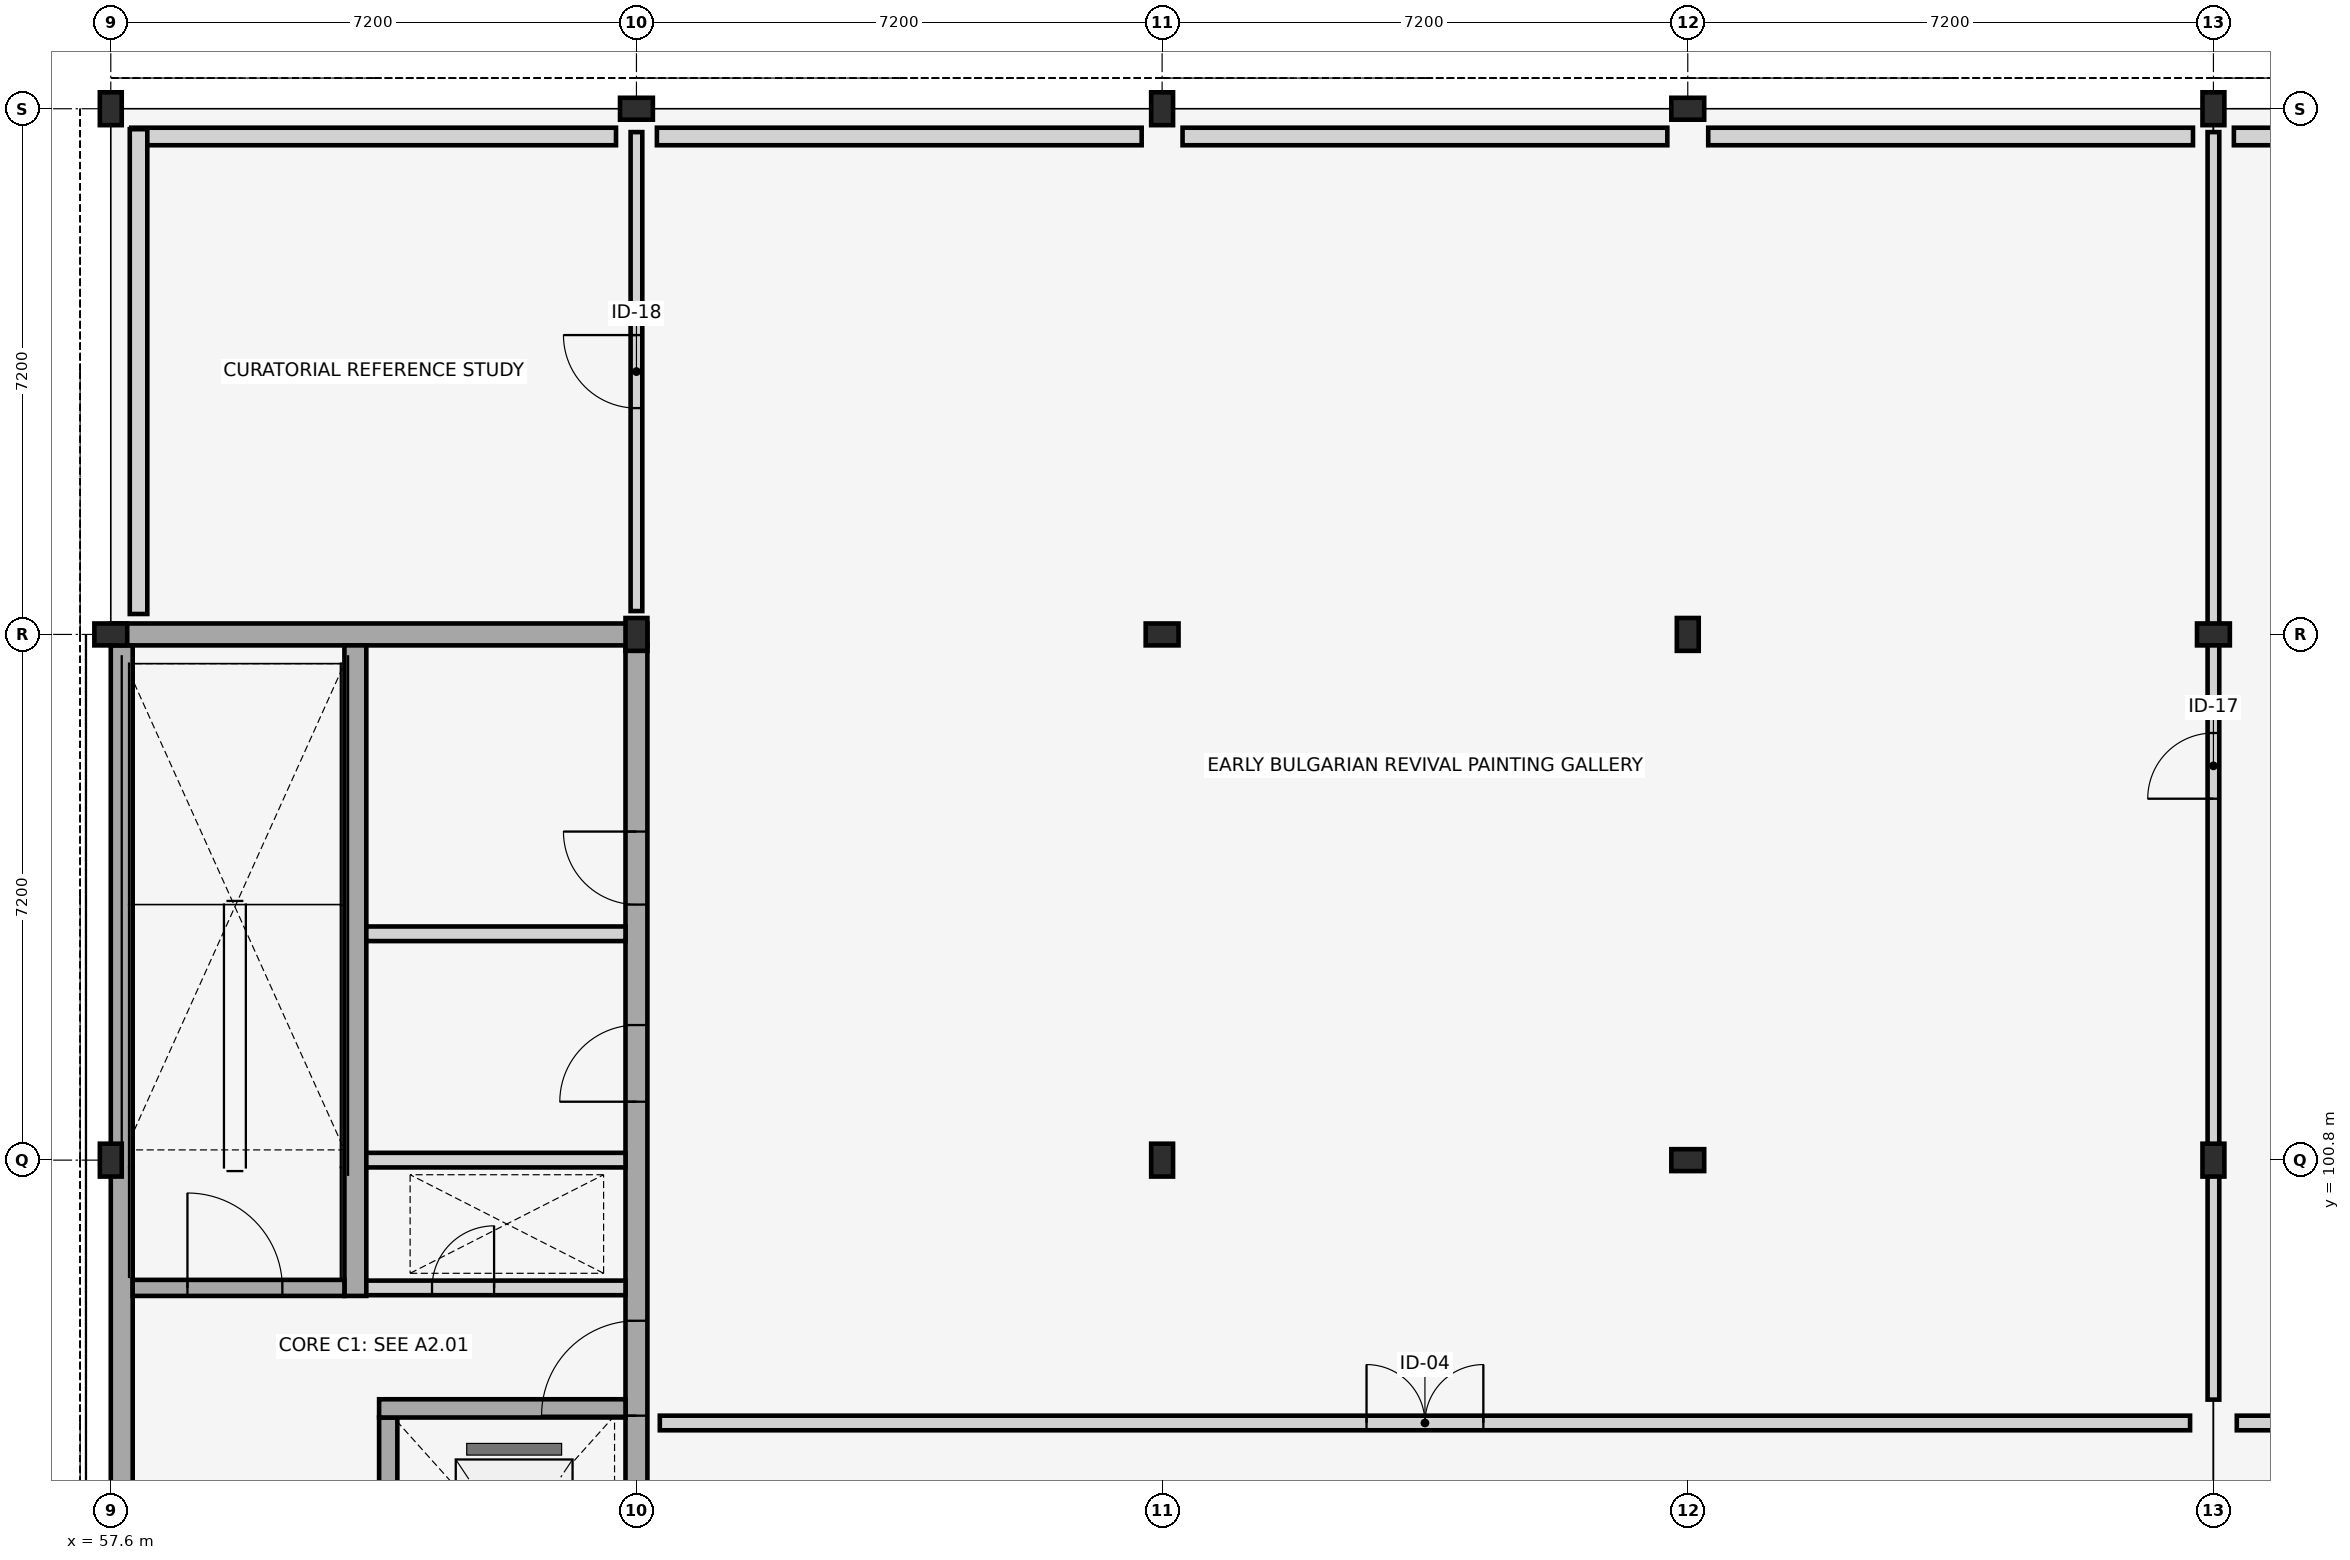
"""IFC4 building model, lengths in metres.
Left out: names, types, materials, properties, quantities, classifications, styles, units other than length and angle.
Written with IfcOpenShell. Run it as: python <this file> out.ifc"""

import sys

from ifc_helpers import new_model, si_unit, direction, frame, frame_2d, origin, origin_2d, place, context, subcontext, project, spatial, rectangle, i_section, extrude, element, fill, save


model = new_model("IFC4")
c1 = context("Model", 3, precision=1e-05, world=origin(), true_north=direction((0.0, 1.0)))
c2 = subcontext(c1, "Body", "Model", "MODEL_VIEW")
j1 = project(units=[si_unit("LENGTHUNIT", "METRE"), si_unit("PLANEANGLEUNIT", "RADIAN")], contexts=[c1])
p1 = place(None, origin())
s1 = spatial("IfcSite", under=j1, at=p1, CompositionType="ELEMENT")
p2 = place(p1, origin())
s2 = spatial("IfcBuilding", under=s1, at=p2, CompositionType="ELEMENT")
p3 = place(p2, frame((0.0, 0.0, 4.5)))
s3 = spatial("IfcBuildingStorey", under=s2, at=p3, CompositionType="ELEMENT", Elevation=4.5)
for number, where, z_axis, x_axis in (
    (1, (57.6, 100.8, 0.0), (0.0, 0.0, 1.0), (1.0, 0.0, 0.0)),
    (2, (57.6, 108.0, 0.0), (0.0, 0.0, 1.0), (0.0, 1.0, 0.0)),
    (3, (57.6, 115.2, 0.0), (0.0, 0.0, 1.0), (1.0, 0.0, 0.0)),
    (4, (64.8, 108.0, 0.0), (0.0, 0.0, 1.0), (1.0, 0.0, 0.0)),
    (5, (64.8, 115.2, 0.0), (0.0, 0.0, 1.0), (0.0, 1.0, 0.0)),
    (6, (72.0, 100.8, 0.0), (0.0, 0.0, 1.0), (1.0, 0.0, 0.0)),
    (7, (72.0, 108.0, 0.0), (0.0, 0.0, 1.0), (0.0, 1.0, 0.0)),
    (8, (72.0, 115.2, 0.0), (0.0, 0.0, 1.0), (1.0, 0.0, 0.0)),
    (9, (79.2, 100.8, 0.0), (0.0, 0.0, 1.0), (0.0, 1.0, 0.0)),
    (10, (79.2, 108.0, 0.0), (0.0, 0.0, 1.0), (1.0, 0.0, 0.0)),
    (11, (79.2, 115.2, 0.0), (0.0, 0.0, 1.0), (0.0, 1.0, 0.0)),
    (12, (86.4, 100.8, 0.0), (0.0, 0.0, 1.0), (1.0, 0.0, 0.0)),
    (13, (86.4, 108.0, 0.0), (0.0, 0.0, 1.0), (0.0, 1.0, 0.0)),
    (14, (86.4, 115.2, 0.0), (0.0, 0.0, 1.0), (1.0, 0.0, 0.0)),
):
    element("IfcColumn", number, at=place(p3, frame(where, z_axis=z_axis, x_axis=x_axis)), inside=s3, PredefinedType="COLUMN", context=c2, shape_type="SweptSolid", body=[
        extrude(i_section(OverallWidth=0.3, OverallDepth=0.45, WebThickness=0.014, FlangeThickness=0.026, FilletRadius=0.027, at=origin_2d()), origin(), (0.0, 0.0, 1.0), 4.2),
    ])
for number, where, z_axis, x_axis in (
    (15, (93.32, 114.82, 0.0), (0.0, 0.0, 1.0), (-1.0, 0.0, 0.0)),
    (16, (86.12, 114.82, 0.0), (0.0, 0.0, 1.0), (-1.0, 0.0, 0.0)),
):
    element("IfcWall", number, at=place(p3, frame(where, z_axis=z_axis, x_axis=x_axis)), inside=s3, PredefinedType="STANDARD", context=c2, shape_type="SweptSolid", body=[
        extrude(rectangle(XDim=6.64, YDim=0.24, at=frame_2d((3.32, 0.0))), origin(), (0.0, 0.0, 1.0), 3.58),
    ])
for number, where, z_axis, x_axis in (
    (17, (78.92, 114.82, 0.0), (0.0, 0.0, 1.0), (-1.0, 0.0, 0.0)),
    (18, (71.72, 114.82, 0.0), (0.0, 0.0, 1.0), (-1.0, 0.0, 0.0)),
):
    element("IfcWall", number, at=place(p3, frame(where, z_axis=z_axis, x_axis=x_axis)), inside=s3, PredefinedType="STANDARD", context=c2, shape_type="SweptSolid", body=[
        extrude(rectangle(XDim=6.64, YDim=0.24, at=frame_2d((3.32, 0.0))), origin(), (0.0, 0.0, 1.0), 3.58),
    ])
p4 = place(p3, frame((64.52, 114.82, 0.0), z_axis=(0.0, 0.0, 1.0), x_axis=(-1.0, 0.0, 0.0)))
e19 = element("IfcWall", 19, at=p4, inside=s3, PredefinedType="STANDARD", context=c2, shape_type="SweptSolid", body=[
    extrude(rectangle(XDim=6.64, YDim=0.24, at=frame_2d((3.32, 0.0))), origin(), (0.0, 0.0, 1.0), 3.58),
])
p5 = place(p3, frame((57.98, 114.92, 0.0), z_axis=(0.0, 0.0, 1.0), x_axis=(0.0, -1.0, 0.0)))
e20 = element("IfcWall", 20, at=p5, inside=s3, PredefinedType="STANDARD", context=c2, shape_type="SweptSolid", body=[
    extrude(rectangle(XDim=6.64, YDim=0.24, at=frame_2d((3.32, 0.0))), origin(), (0.0, 0.0, 1.0), 3.58),
])
p6 = place(p3, frame((57.6, 108.0, 0.0), z_axis=(0.0, 0.0, 1.0), x_axis=(1.0, 0.0, 0.0)))
e21 = element("IfcWall", 21, at=p6, inside=s3, PredefinedType="SHEAR", context=c2, shape_type="SweptSolid", body=[
    extrude(rectangle(XDim=7.35, YDim=0.3, at=frame_2d((3.675, 0.0))), origin(), (0.0, 0.0, 1.0), 3.98),
])
p7 = place(p3, frame((57.75, 93.75, 0.0), z_axis=(0.0, 0.0, 1.0), x_axis=(0.0, 1.0, 0.0)))
e22 = element("IfcWall", 22, at=p7, inside=s3, PredefinedType="SHEAR", context=c2, shape_type="SweptSolid", body=[
    extrude(rectangle(XDim=14.1, YDim=0.3, at=frame_2d((7.05, 0.0))), origin(), (0.0, 0.0, 1.0), 3.98),
])
p8 = place(p3, frame((64.8, 93.75, 0.0), z_axis=(0.0, 0.0, 1.0), x_axis=(0.0, 1.0, 0.0)))
e23 = element("IfcWall", 23, at=p8, inside=s3, PredefinedType="SHEAR", context=c2, shape_type="SweptSolid", body=[
    extrude(rectangle(XDim=14.1, YDim=0.3, at=frame_2d((7.05, 0.0))), origin(), (0.0, 0.0, 1.0), 3.98),
])
p9 = place(p8, frame((3.55, 0.0, 0.0)))
e24 = element("IfcOpeningElement", 24, at=p9, cuts=e23, PredefinedType="OPENING", context=c2, shape_type="SweptSolid", body=[
    extrude(rectangle(XDim=1.3, YDim=2.2, at=frame_2d((0.65, 1.1))), frame((0.0, 0.16, 0.0), z_axis=(0.0, -1.0, 0.0), x_axis=(1.0, 0.0, 0.0)), (0.0, 0.0, 1.0), 0.32),
])
p10 = place(p8, frame((7.85, 0.0, 0.0)))
e25 = element("IfcOpeningElement", 25, at=p10, cuts=e23, PredefinedType="OPENING", context=c2, shape_type="SweptSolid", body=[
    extrude(rectangle(XDim=1.05, YDim=2.15, at=frame_2d((0.525, 1.075))), frame((0.0, 0.16, 0.0), z_axis=(0.0, -1.0, 0.0), x_axis=(1.0, 0.0, 0.0)), (0.0, 0.0, 1.0), 0.32),
])
p11 = place(p8, frame((10.55, 0.0, 0.0)))
e26 = element("IfcOpeningElement", 26, at=p11, cuts=e23, PredefinedType="OPENING", context=c2, shape_type="SweptSolid", body=[
    extrude(rectangle(XDim=1.0, YDim=2.15, at=frame_2d((0.5, 1.075))), frame((0.0, 0.16, 0.0), z_axis=(0.0, -1.0, 0.0), x_axis=(1.0, 0.0, 0.0)), (0.0, 0.0, 1.0), 0.32),
])
p12 = place(p3, frame((61.4, 93.75, 0.0), z_axis=(0.0, 0.0, 1.0), x_axis=(0.0, 1.0, 0.0)))
e27 = element("IfcWall", 27, at=p12, inside=s3, PredefinedType="SHEAR", context=c2, shape_type="SweptSolid", body=[
    extrude(rectangle(XDim=3.525, YDim=0.25, at=frame_2d((1.762, 0.0))), origin(), (0.0, 0.0, 1.0), 3.98),
])
p13 = place(p12, frame((1.2, 0.0, 0.0)))
e28 = element("IfcOpeningElement", 28, at=p13, cuts=e27, PredefinedType="OPENING", context=c2, shape_type="SweptSolid", body=[
    extrude(rectangle(XDim=1.1, YDim=2.15, at=frame_2d((0.55, 1.075))), frame((0.0, 0.135, 0.0), z_axis=(0.0, -1.0, 0.0), x_axis=(1.0, 0.0, 0.0)), (0.0, 0.0, 1.0), 0.27),
])
p14 = place(p3, frame((60.95, 98.94, 0.0), z_axis=(0.0, 0.0, 1.0), x_axis=(0.0, 1.0, 0.0)))
e29 = element("IfcWall", 29, at=p14, inside=s3, PredefinedType="SHEAR", context=c2, shape_type="SweptSolid", body=[
    extrude(rectangle(XDim=8.91, YDim=0.3, at=frame_2d((4.455, 0.0))), origin(), (0.0, 0.0, 1.0), 3.98),
])
p15 = place(p3, frame((61.1, 99.05, 0.0), z_axis=(0.0, 0.0, 1.0), x_axis=(1.0, 0.0, 0.0)))
e30 = element("IfcWall", 30, at=p15, inside=s3, PredefinedType="PLUMBINGWALL", context=c2, shape_type="SweptSolid", body=[
    extrude(rectangle(XDim=3.55, YDim=0.2, at=frame_2d((1.775, 0.0))), origin(), (0.0, 0.0, 1.0), 3.4),
])
p16 = place(p15, frame((0.9, 0.0, 0.0)))
e31 = element("IfcOpeningElement", 31, at=p16, cuts=e30, PredefinedType="OPENING", context=c2, shape_type="SweptSolid", body=[
    extrude(rectangle(XDim=0.85, YDim=2.05, at=frame_2d((0.425, 1.025))), frame((0.0, 0.11, 0.0), z_axis=(0.0, -1.0, 0.0), x_axis=(1.0, 0.0, 0.0)), (0.0, 0.0, 1.0), 0.22),
])
p17 = place(p3, frame((57.9, 99.05, 0.0), z_axis=(0.0, 0.0, 1.0), x_axis=(1.0, 0.0, 0.0)))
e32 = element("IfcWall", 32, at=p17, inside=s3, PredefinedType="SHEAR", context=c2, shape_type="SweptSolid", body=[
    extrude(rectangle(XDim=2.9, YDim=0.22, at=frame_2d((1.45, 0.0))), origin(), (0.0, 0.0, 1.0), 3.98),
])
p18 = place(p17, frame((0.75, 0.0, 0.0)))
e33 = element("IfcOpeningElement", 33, at=p18, cuts=e32, PredefinedType="OPENING", context=c2, shape_type="SweptSolid", body=[
    extrude(rectangle(XDim=1.3, YDim=2.2, at=frame_2d((0.65, 1.1))), frame((0.0, 0.12, 0.0), z_axis=(0.0, -1.0, 0.0), x_axis=(1.0, 0.0, 0.0)), (0.0, 0.0, 1.0), 0.24),
])
p19 = place(p3, frame((61.275, 97.4, 0.0), z_axis=(0.0, 0.0, 1.0), x_axis=(1.0, 0.0, 0.0)))
e34 = element("IfcWall", 34, at=p19, inside=s3, PredefinedType="SHEAR", context=c2, shape_type="SweptSolid", body=[
    extrude(rectangle(XDim=3.375, YDim=0.25, at=frame_2d((1.688, 0.0))), origin(), (0.0, 0.0, 1.0), 3.98),
])
for number, where, z_axis, x_axis in (
    (35, (61.1, 100.8, 0.0), (0.0, 0.0, 1.0), (1.0, 0.0, 0.0)),
    (36, (61.1, 103.9, 0.0), (0.0, 0.0, 1.0), (1.0, 0.0, 0.0)),
):
    element("IfcWall", number, at=place(p3, frame(where, z_axis=z_axis, x_axis=x_axis)), inside=s3, PredefinedType="PLUMBINGWALL", context=c2, shape_type="SweptSolid", body=[
        extrude(rectangle(XDim=3.55, YDim=0.2, at=frame_2d((1.775, 0.0))), origin(), (0.0, 0.0, 1.0), 3.4),
    ])
p20 = place(p3, frame((65.12, 97.2, 0.0), z_axis=(0.0, 0.0, 1.0), x_axis=(1.0, 0.0, 0.0)))
e37 = element("IfcWall", 37, at=p20, inside=s3, PredefinedType="PARTITIONING", context=c2, shape_type="SweptSolid", body=[
    extrude(rectangle(XDim=20.96, YDim=0.2, at=frame_2d((10.48, 0.0))), origin(), (0.0, 0.0, 1.0), 3.15),
])
p21 = place(p20, frame((9.68, 0.0, 0.0)))
e38 = element("IfcOpeningElement", 38, at=p21, cuts=e37, PredefinedType="OPENING", context=c2, shape_type="SweptSolid", body=[
    extrude(rectangle(XDim=1.6, YDim=2.35, at=frame_2d((0.8, 1.175))), frame((0.0, 0.11, 0.0), z_axis=(0.0, -1.0, 0.0), x_axis=(1.0, 0.0, 0.0)), (0.0, 0.0, 1.0), 0.22),
])
p22 = place(p3, frame((86.72, 97.2, 0.0), z_axis=(0.0, 0.0, 1.0), x_axis=(1.0, 0.0, 0.0)))
e39 = element("IfcWall", 39, at=p22, inside=s3, PredefinedType="PARTITIONING", context=c2, shape_type="SweptSolid", body=[
    extrude(rectangle(XDim=13.76, YDim=0.2, at=frame_2d((6.88, 0.0))), origin(), (0.0, 0.0, 1.0), 3.15),
])
p23 = place(p22, frame((1.752, 0.0, 0.0)))
e40 = element("IfcOpeningElement", 40, at=p23, cuts=e39, PredefinedType="OPENING", context=c2, shape_type="SweptSolid", body=[
    extrude(rectangle(XDim=1.5, YDim=2.25, at=frame_2d((0.75, 1.125))), frame((0.0, 0.11, 0.0), z_axis=(0.0, -1.0, 0.0), x_axis=(1.0, 0.0, 0.0)), (0.0, 0.0, 1.0), 0.22),
])
p24 = place(p3, frame((86.4, 97.52, 0.0), z_axis=(0.0, 0.0, 1.0), x_axis=(0.0, 1.0, 0.0)))
e41 = element("IfcWall", 41, at=p24, inside=s3, PredefinedType="PARTITIONING", context=c2, shape_type="SweptSolid", body=[
    extrude(rectangle(XDim=17.36, YDim=0.16, at=frame_2d((8.68, 0.0))), origin(), (0.0, 0.0, 1.0), 3.15),
])
p25 = place(p24, frame((8.23, 0.0, 0.0)))
e42 = element("IfcOpeningElement", 42, at=p25, cuts=e41, PredefinedType="OPENING", context=c2, shape_type="SweptSolid", body=[
    extrude(rectangle(XDim=0.9, YDim=2.1, at=frame_2d((0.45, 1.05))), frame((0.0, 0.09, 0.0), z_axis=(0.0, -1.0, 0.0), x_axis=(1.0, 0.0, 0.0)), (0.0, 0.0, 1.0), 0.18),
])
p26 = place(p3, frame((64.8, 108.32, 0.0), z_axis=(0.0, 0.0, 1.0), x_axis=(0.0, 1.0, 0.0)))
e43 = element("IfcWall", 43, at=p26, inside=s3, PredefinedType="PARTITIONING", context=c2, shape_type="SweptSolid", body=[
    extrude(rectangle(XDim=6.56, YDim=0.16, at=frame_2d((3.28, 0.0))), origin(), (0.0, 0.0, 1.0), 3.15),
])
p27 = place(p26, frame((2.78, 0.0, 0.0)))
e44 = element("IfcOpeningElement", 44, at=p27, cuts=e43, PredefinedType="OPENING", context=c2, shape_type="SweptSolid", body=[
    extrude(rectangle(XDim=1.0, YDim=2.25, at=frame_2d((0.5, 1.125))), frame((0.0, 0.09, 0.0), z_axis=(0.0, -1.0, 0.0), x_axis=(1.0, 0.0, 0.0)), (0.0, 0.0, 1.0), 0.18),
])
p28 = place(p9, origin())
e45 = element("IfcDoor", 45, at=p28, inside=s3, OperationType="SINGLE_SWING_LEFT", PredefinedType="DOOR", context=c2, shape_type="SweptSolid", body=[
    extrude(rectangle(XDim=1.3, YDim=2.2, at=frame_2d((0.65, 1.1))), frame((0.0, 0.025, 0.0), z_axis=(0.0, -1.0, 0.0), x_axis=(1.0, 0.0, 0.0)), (0.0, 0.0, 1.0), 0.05),
])
fill(e24, e45)
p29 = place(p10, origin())
e46 = element("IfcDoor", 46, at=p29, inside=s3, OperationType="SINGLE_SWING_LEFT", PredefinedType="DOOR", context=c2, shape_type="SweptSolid", body=[
    extrude(rectangle(XDim=1.05, YDim=2.15, at=frame_2d((0.525, 1.075))), frame((0.0, 0.025, 0.0), z_axis=(0.0, -1.0, 0.0), x_axis=(1.0, 0.0, 0.0)), (0.0, 0.0, 1.0), 0.05),
])
fill(e25, e46)
p30 = place(p11, origin())
e47 = element("IfcDoor", 47, at=p30, inside=s3, OperationType="SINGLE_SWING_RIGHT", PredefinedType="DOOR", context=c2, shape_type="SweptSolid", body=[
    extrude(rectangle(XDim=1.0, YDim=2.15, at=frame_2d((0.5, 1.075))), frame((0.0, 0.025, 0.0), z_axis=(0.0, -1.0, 0.0), x_axis=(1.0, 0.0, 0.0)), (0.0, 0.0, 1.0), 0.05),
])
fill(e26, e47)
p31 = place(p16, origin())
e48 = element("IfcDoor", 48, at=p31, inside=s3, OperationType="SINGLE_SWING_RIGHT", PredefinedType="TRAPDOOR", context=c2, shape_type="SweptSolid", body=[
    extrude(rectangle(XDim=0.85, YDim=2.05, at=frame_2d((0.425, 1.025))), frame((0.0, 0.025, 0.0), z_axis=(0.0, -1.0, 0.0), x_axis=(1.0, 0.0, 0.0)), (0.0, 0.0, 1.0), 0.05),
])
fill(e31, e48)
p32 = place(p18, origin())
e49 = element("IfcDoor", 49, at=p32, inside=s3, OperationType="SINGLE_SWING_LEFT", PredefinedType="DOOR", context=c2, shape_type="SweptSolid", body=[
    extrude(rectangle(XDim=1.3, YDim=2.2, at=frame_2d((0.65, 1.1))), frame((0.0, 0.025, 0.0), z_axis=(0.0, -1.0, 0.0), x_axis=(1.0, 0.0, 0.0)), (0.0, 0.0, 1.0), 0.05),
])
fill(e33, e49)
p33 = place(p21, origin())
e50 = element("IfcDoor", 50, at=p33, inside=s3, OperationType="DOUBLE_DOOR_SINGLE_SWING", PredefinedType="DOOR", context=c2, shape_type="SweptSolid", body=[
    extrude(rectangle(XDim=1.6, YDim=2.35, at=frame_2d((0.8, 1.175))), frame((0.0, 0.025, 0.0), z_axis=(0.0, -1.0, 0.0), x_axis=(1.0, 0.0, 0.0)), (0.0, 0.0, 1.0), 0.05),
])
fill(e38, e50)
p34 = place(p25, origin())
e51 = element("IfcDoor", 51, at=p34, inside=s3, OperationType="SINGLE_SWING_LEFT", PredefinedType="DOOR", context=c2, shape_type="SweptSolid", body=[
    extrude(rectangle(XDim=0.9, YDim=2.1, at=frame_2d((0.45, 1.05))), frame((0.0, 0.025, 0.0), z_axis=(0.0, -1.0, 0.0), x_axis=(1.0, 0.0, 0.0)), (0.0, 0.0, 1.0), 0.05),
])
fill(e42, e51)
p35 = place(p27, origin())
e52 = element("IfcDoor", 52, at=p35, inside=s3, OperationType="SINGLE_SWING_RIGHT", PredefinedType="DOOR", context=c2, shape_type="SweptSolid", body=[
    extrude(rectangle(XDim=1.0, YDim=2.25, at=frame_2d((0.5, 1.125))), frame((0.0, 0.025, 0.0), z_axis=(0.0, -1.0, 0.0), x_axis=(1.0, 0.0, 0.0)), (0.0, 0.0, 1.0), 0.05),
])
fill(e44, e52)
save(model, sys.argv[1])
